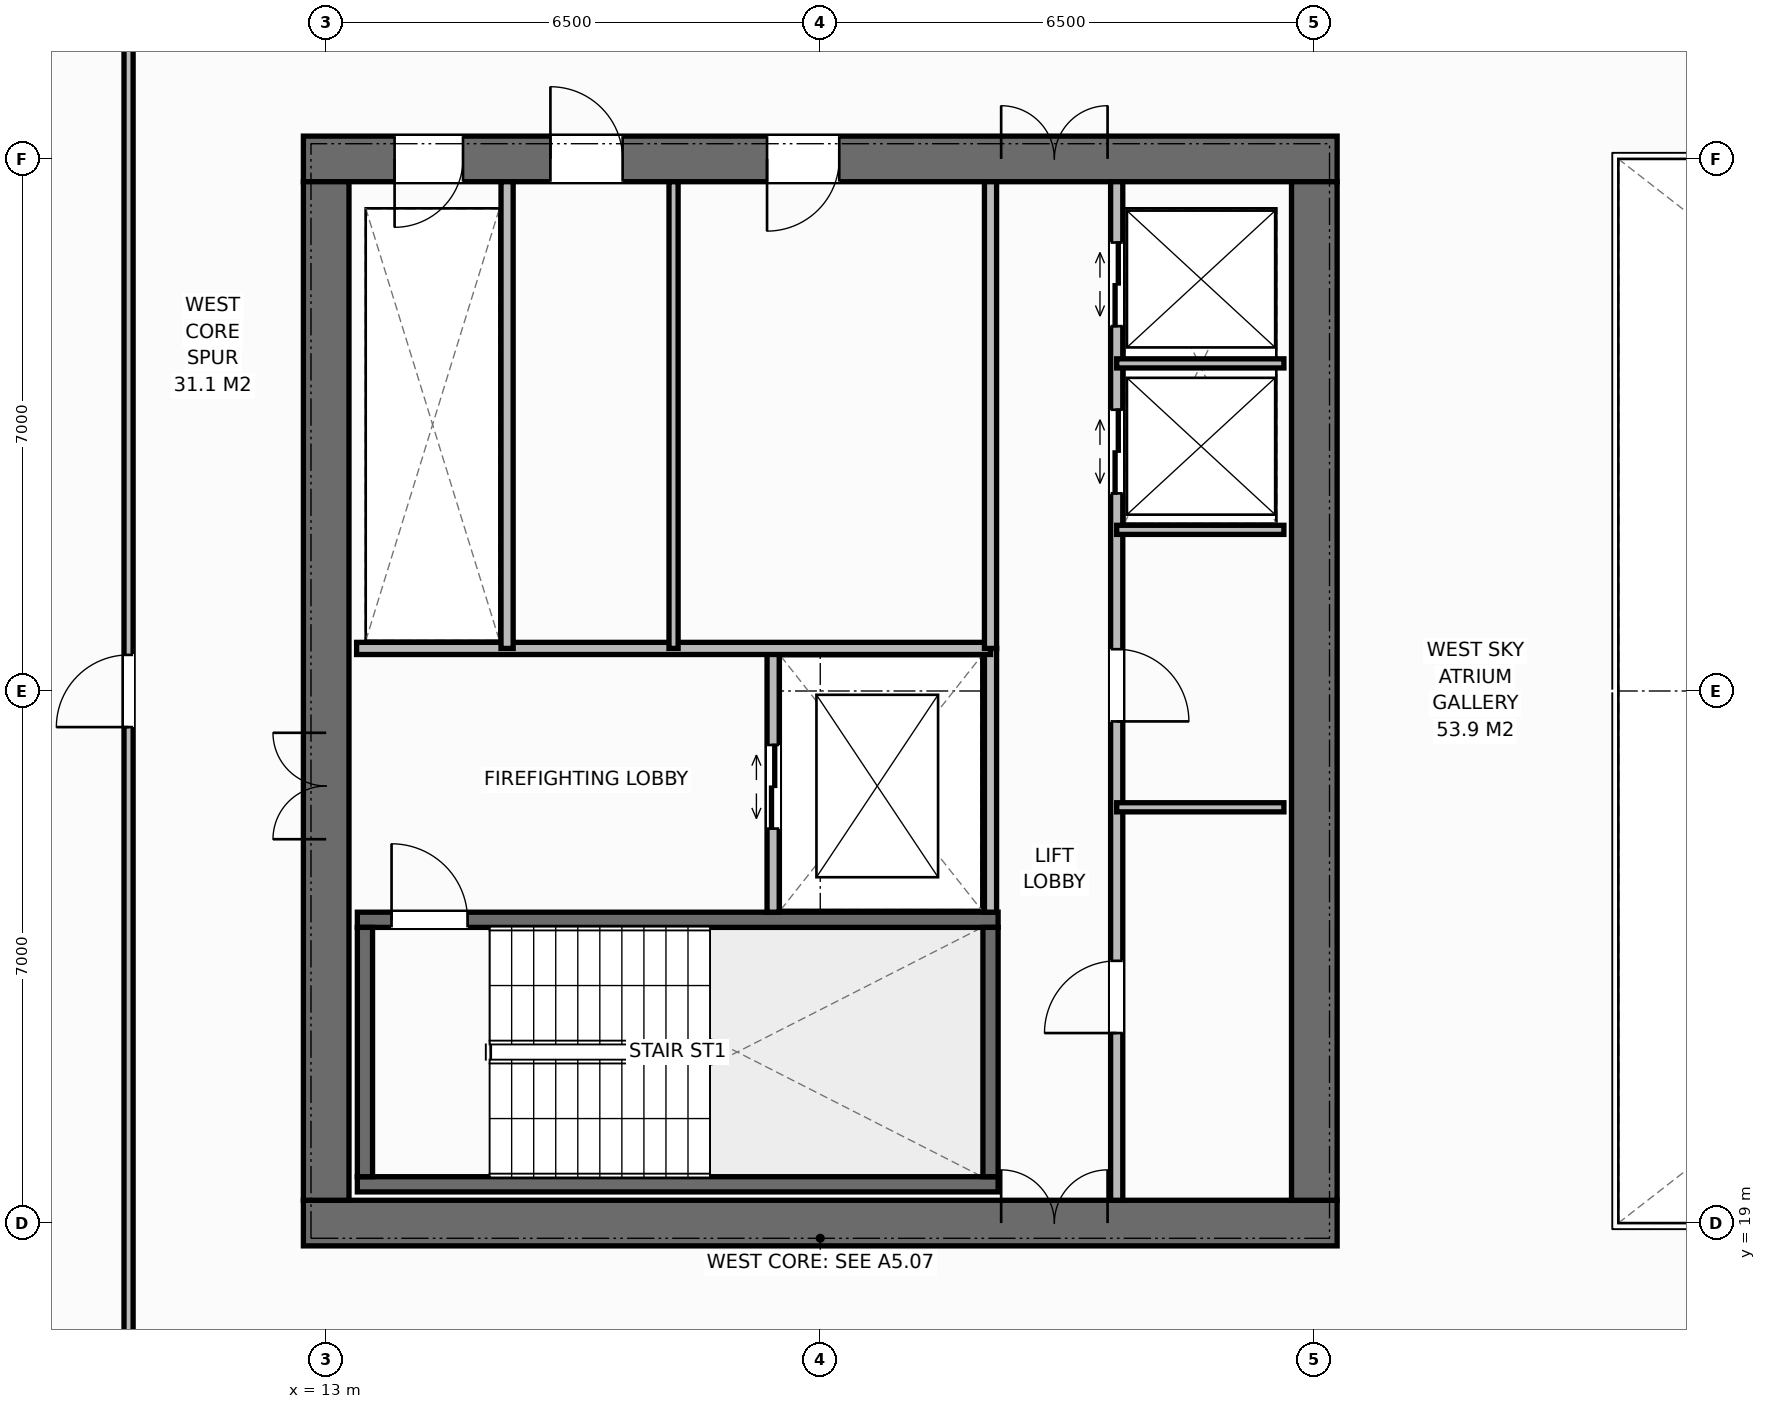
"""IFC4 building model, lengths in metres.
Left out: names, types, materials, properties, quantities, classifications, styles, units other than length and angle.
Written with IfcOpenShell. Run it as: python <this file> out.ifc"""

import sys

from ifc_helpers import new_model, si_unit, direction, frame, frame_2d, origin, place, context, subcontext, project, spatial, rectangle, extrude, element, fill, save


model = new_model("IFC4")
c1 = context("Model", 3, precision=1e-05, world=origin(), true_north=direction((0.0, 1.0)))
c2 = subcontext(c1, "Body", "Model", "MODEL_VIEW")
j1 = project(units=[si_unit("LENGTHUNIT", "METRE"), si_unit("PLANEANGLEUNIT", "RADIAN")], contexts=[c1])
p1 = place(None, origin())
s1 = spatial("IfcSite", under=j1, at=p1, CompositionType="ELEMENT")
p2 = place(p1, origin())
s2 = spatial("IfcBuilding", under=s1, at=p2, CompositionType="ELEMENT")
p3 = place(p2, frame((0.0, 0.0, 167.0)))
s3 = spatial("IfcBuildingStorey", under=s2, at=p3, CompositionType="ELEMENT", Elevation=167.0)
p4 = place(p3, frame((12.7, 19.0, 0.0), z_axis=(0.0, 0.0, 1.0), x_axis=(1.0, 0.0, 0.0)))
e1 = element("IfcWall", 1, at=p4, inside=s3, PredefinedType="SHEAR", context=c2, shape_type="SweptSolid", body=[
    extrude(rectangle(XDim=13.6, YDim=0.6, at=frame_2d((6.8, 0.0))), origin(), (0.0, 0.0, 1.0), 3.8),
])
p5 = place(p4, frame((9.18, 0.0, 0.0)))
e2 = element("IfcOpeningElement", 2, at=p5, cuts=e1, PredefinedType="OPENING", context=c2, shape_type="SweptSolid", body=[
    extrude(rectangle(XDim=1.4, YDim=2.2, at=frame_2d((0.7, 1.1))), frame((0.0, 0.31, 0.0), z_axis=(0.0, -1.0, 0.0), x_axis=(1.0, 0.0, 0.0)), (0.0, 0.0, 1.0), 0.62),
])
p6 = place(p3, frame((12.7, 33.0, 0.0), z_axis=(0.0, 0.0, 1.0), x_axis=(1.0, 0.0, 0.0)))
e3 = element("IfcWall", 3, at=p6, inside=s3, PredefinedType="SHEAR", context=c2, shape_type="SweptSolid", body=[
    extrude(rectangle(XDim=13.6, YDim=0.6, at=frame_2d((6.8, 0.0))), origin(), (0.0, 0.0, 1.0), 3.8),
])
p7 = place(p6, frame((1.2, 0.0, 0.0)))
e4 = element("IfcOpeningElement", 4, at=p7, cuts=e3, PredefinedType="OPENING", context=c2, shape_type="SweptSolid", body=[
    extrude(rectangle(XDim=0.9, YDim=2.15, at=frame_2d((0.45, 1.075))), frame((0.0, 0.31, 0.0), z_axis=(0.0, -1.0, 0.0), x_axis=(1.0, 0.0, 0.0)), (0.0, 0.0, 1.0), 0.62),
])
p8 = place(p6, frame((3.25, 0.0, 0.0)))
e5 = element("IfcOpeningElement", 5, at=p8, cuts=e3, PredefinedType="OPENING", context=c2, shape_type="SweptSolid", body=[
    extrude(rectangle(XDim=0.95, YDim=2.15, at=frame_2d((0.475, 1.075))), frame((0.0, 0.31, 0.0), z_axis=(0.0, -1.0, 0.0), x_axis=(1.0, 0.0, 0.0)), (0.0, 0.0, 1.0), 0.62),
])
p9 = place(p6, frame((6.1, 0.0, 0.0)))
e6 = element("IfcOpeningElement", 6, at=p9, cuts=e3, PredefinedType="OPENING", context=c2, shape_type="SweptSolid", body=[
    extrude(rectangle(XDim=0.95, YDim=2.15, at=frame_2d((0.475, 1.075))), frame((0.0, 0.31, 0.0), z_axis=(0.0, -1.0, 0.0), x_axis=(1.0, 0.0, 0.0)), (0.0, 0.0, 1.0), 0.62),
])
p10 = place(p6, frame((9.18, 0.0, 0.0)))
e7 = element("IfcOpeningElement", 7, at=p10, cuts=e3, PredefinedType="OPENING", context=c2, shape_type="SweptSolid", body=[
    extrude(rectangle(XDim=1.4, YDim=2.2, at=frame_2d((0.7, 1.1))), frame((0.0, 0.31, 0.0), z_axis=(0.0, -1.0, 0.0), x_axis=(1.0, 0.0, 0.0)), (0.0, 0.0, 1.0), 0.62),
])
p11 = place(p3, frame((13.0, 19.3, 0.0), z_axis=(0.0, 0.0, 1.0), x_axis=(0.0, 1.0, 0.0)))
e8 = element("IfcWall", 8, at=p11, inside=s3, PredefinedType="SHEAR", context=c2, shape_type="SweptSolid", body=[
    extrude(rectangle(XDim=13.4, YDim=0.6, at=frame_2d((6.7, 0.0))), origin(), (0.0, 0.0, 1.0), 3.8),
])
p12 = place(p11, frame((4.75, 0.0, 0.0)))
e9 = element("IfcOpeningElement", 9, at=p12, cuts=e8, PredefinedType="OPENING", context=c2, shape_type="SweptSolid", body=[
    extrude(rectangle(XDim=1.4, YDim=2.2, at=frame_2d((0.7, 1.1))), frame((0.0, 0.31, 0.0), z_axis=(0.0, -1.0, 0.0), x_axis=(1.0, 0.0, 0.0)), (0.0, 0.0, 1.0), 0.62),
])
p13 = place(p3, frame((26.0, 19.3, 0.0), z_axis=(0.0, 0.0, 1.0), x_axis=(0.0, 1.0, 0.0)))
e10 = element("IfcWall", 10, at=p13, inside=s3, PredefinedType="SHEAR", context=c2, shape_type="SweptSolid", body=[
    extrude(rectangle(XDim=13.4, YDim=0.6, at=frame_2d((6.7, 0.0))), origin(), (0.0, 0.0, 1.0), 3.8),
])
p14 = place(p3, frame((13.41, 19.51, 0.0), z_axis=(0.0, 0.0, 1.0), x_axis=(1.0, 0.0, 0.0)))
e11 = element("IfcWall", 11, at=p14, inside=s3, PredefinedType="SHEAR", context=c2, shape_type="SweptSolid", body=[
    extrude(rectangle(XDim=8.43, YDim=0.2, at=frame_2d((4.215, 0.0))), origin(), (0.0, 0.0, 1.0), 3.8),
])
p15 = place(p3, frame((13.41, 22.99, 0.0), z_axis=(0.0, 0.0, 1.0), x_axis=(1.0, 0.0, 0.0)))
e12 = element("IfcWall", 12, at=p15, inside=s3, PredefinedType="SHEAR", context=c2, shape_type="SweptSolid", body=[
    extrude(rectangle(XDim=8.43, YDim=0.2, at=frame_2d((4.215, 0.0))), origin(), (0.0, 0.0, 1.0), 3.8),
])
p16 = place(p15, frame((0.45, 0.0, 0.0)))
e13 = element("IfcOpeningElement", 13, at=p16, cuts=e12, PredefinedType="OPENING", context=c2, shape_type="SweptSolid", body=[
    extrude(rectangle(XDim=1.0, YDim=2.15, at=frame_2d((0.5, 1.075))), frame((0.0, 0.11, 0.0), z_axis=(0.0, -1.0, 0.0), x_axis=(1.0, 0.0, 0.0)), (0.0, 0.0, 1.0), 0.22),
])
for number, where, z_axis, x_axis in (
    (14, (13.51, 19.61, 0.0), (0.0, 0.0, 1.0), (0.0, 1.0, 0.0)),
    (15, (21.74, 19.61, 0.0), (0.0, 0.0, 1.0), (0.0, 1.0, 0.0)),
):
    element("IfcWall", number, at=place(p3, frame(where, z_axis=z_axis, x_axis=x_axis)), inside=s3, PredefinedType="SHEAR", context=c2, shape_type="SweptSolid", body=[
        extrude(rectangle(XDim=3.28, YDim=0.2, at=frame_2d((1.64, 0.0))), origin(), (0.0, 0.0, 1.0), 3.8),
    ])
p17 = place(p3, frame((21.74, 23.09, 0.0), z_axis=(0.0, 0.0, 1.0), x_axis=(0.0, 1.0, 0.0)))
e16 = element("IfcWall", 16, at=p17, inside=s3, PredefinedType="STANDARD", context=c2, shape_type="SweptSolid", body=[
    extrude(rectangle(XDim=3.47, YDim=0.16, at=frame_2d((1.735, 0.0))), origin(), (0.0, 0.0, 1.0), 3.572),
])
p18 = place(p3, frame((18.88, 23.09, 0.0), z_axis=(0.0, 0.0, 1.0), x_axis=(0.0, 1.0, 0.0)))
e17 = element("IfcWall", 17, at=p18, inside=s3, PredefinedType="STANDARD", context=c2, shape_type="SweptSolid", body=[
    extrude(rectangle(XDim=3.47, YDim=0.16, at=frame_2d((1.735, 0.0))), origin(), (0.0, 0.0, 1.0), 3.572),
])
p19 = place(p18, frame((1.1, 0.0, 0.0)))
e18 = element("IfcOpeningElement", 18, at=p19, cuts=e17, PredefinedType="OPENING", context=c2, shape_type="SweptSolid", body=[
    extrude(rectangle(XDim=1.1, YDim=2.2, at=frame_2d((0.55, 1.1))), frame((0.0, 0.09, 0.0), z_axis=(0.0, -1.0, 0.0), x_axis=(1.0, 0.0, 0.0)), (0.0, 0.0, 1.0), 0.18),
])
p20 = place(p3, frame((13.4, 26.56, 0.0), z_axis=(0.0, 0.0, 1.0), x_axis=(1.0, 0.0, 0.0)))
e19 = element("IfcWall", 19, at=p20, inside=s3, PredefinedType="STANDARD", context=c2, shape_type="SweptSolid", body=[
    extrude(rectangle(XDim=8.34, YDim=0.16, at=frame_2d((4.17, 0.0))), origin(), (0.0, 0.0, 1.0), 3.572),
])
p21 = place(p3, frame((15.38, 26.56, 0.0), z_axis=(0.0, 0.0, 1.0), x_axis=(0.0, 1.0, 0.0)))
e20 = element("IfcWall", 20, at=p21, inside=s3, PredefinedType="STANDARD", context=c2, shape_type="SweptSolid", body=[
    extrude(rectangle(XDim=6.14, YDim=0.16, at=frame_2d((3.07, 0.0))), origin(), (0.0, 0.0, 1.0), 3.572),
])
p22 = place(p3, frame((17.57, 26.56, 0.0), z_axis=(0.0, 0.0, 1.0), x_axis=(0.0, 1.0, 0.0)))
e21 = element("IfcWall", 21, at=p22, inside=s3, PredefinedType="PARTITIONING", context=c2, shape_type="SweptSolid", body=[
    extrude(rectangle(XDim=6.14, YDim=0.12, at=frame_2d((3.07, 0.0))), origin(), (0.0, 0.0, 1.0), 3.572),
])
p23 = place(p3, frame((21.74, 26.56, 0.0), z_axis=(0.0, 0.0, 1.0), x_axis=(0.0, 1.0, 0.0)))
e22 = element("IfcWall", 22, at=p23, inside=s3, PredefinedType="STANDARD", context=c2, shape_type="SweptSolid", body=[
    extrude(rectangle(XDim=6.14, YDim=0.16, at=frame_2d((3.07, 0.0))), origin(), (0.0, 0.0, 1.0), 3.572),
])
p24 = place(p3, frame((23.4, 19.3, 0.0), z_axis=(0.0, 0.0, 1.0), x_axis=(0.0, 1.0, 0.0)))
e23 = element("IfcWall", 23, at=p24, inside=s3, PredefinedType="STANDARD", context=c2, shape_type="SweptSolid", body=[
    extrude(rectangle(XDim=13.4, YDim=0.16, at=frame_2d((6.7, 0.0))), origin(), (0.0, 0.0, 1.0), 3.572),
])
p25 = place(p24, frame((2.2, 0.0, 0.0)))
e24 = element("IfcOpeningElement", 24, at=p25, cuts=e23, PredefinedType="OPENING", context=c2, shape_type="SweptSolid", body=[
    extrude(rectangle(XDim=0.95, YDim=2.15, at=frame_2d((0.475, 1.075))), frame((0.0, 0.09, 0.0), z_axis=(0.0, -1.0, 0.0), x_axis=(1.0, 0.0, 0.0)), (0.0, 0.0, 1.0), 0.18),
])
p26 = place(p24, frame((6.3, 0.0, 0.0)))
e25 = element("IfcOpeningElement", 25, at=p26, cuts=e23, PredefinedType="OPENING", context=c2, shape_type="SweptSolid", body=[
    extrude(rectangle(XDim=0.95, YDim=2.15, at=frame_2d((0.475, 1.075))), frame((0.0, 0.09, 0.0), z_axis=(0.0, -1.0, 0.0), x_axis=(1.0, 0.0, 0.0)), (0.0, 0.0, 1.0), 0.18),
])
p27 = place(p24, frame((9.3, 0.0, 0.0)))
e26 = element("IfcOpeningElement", 26, at=p27, cuts=e23, PredefinedType="OPENING", context=c2, shape_type="SweptSolid", body=[
    extrude(rectangle(XDim=1.1, YDim=2.2, at=frame_2d((0.55, 1.1))), frame((0.0, 0.09, 0.0), z_axis=(0.0, -1.0, 0.0), x_axis=(1.0, 0.0, 0.0)), (0.0, 0.0, 1.0), 0.18),
])
p28 = place(p24, frame((11.5, 0.0, 0.0)))
e27 = element("IfcOpeningElement", 27, at=p28, cuts=e23, PredefinedType="OPENING", context=c2, shape_type="SweptSolid", body=[
    extrude(rectangle(XDim=1.1, YDim=2.2, at=frame_2d((0.55, 1.1))), frame((0.0, 0.09, 0.0), z_axis=(0.0, -1.0, 0.0), x_axis=(1.0, 0.0, 0.0)), (0.0, 0.0, 1.0), 0.18),
])
for number, where, z_axis, x_axis in (
    (28, (23.4, 24.47, 0.0), (0.0, 0.0, 1.0), (1.0, 0.0, 0.0)),
    (29, (23.4, 28.12, 0.0), (0.0, 0.0, 1.0), (1.0, 0.0, 0.0)),
    (30, (23.4, 30.31, 0.0), (0.0, 0.0, 1.0), (1.0, 0.0, 0.0)),
):
    element("IfcWall", number, at=place(p3, frame(where, z_axis=z_axis, x_axis=x_axis)), inside=s3, PredefinedType="PARTITIONING", context=c2, shape_type="SweptSolid", body=[
        extrude(rectangle(XDim=2.2, YDim=0.12, at=frame_2d((1.1, 0.0))), origin(), (0.0, 0.0, 1.0), 3.572),
    ])
p29 = place(p3, frame((10.4, 16.5, 0.0), z_axis=(0.0, 0.0, 1.0), x_axis=(0.0, 1.0, 0.0)))
e31 = element("IfcWall", 31, at=p29, inside=s3, PredefinedType="PARTITIONING", context=c2, shape_type="SweptSolid", body=[
    extrude(rectangle(XDim=19.0, YDim=0.12, at=frame_2d((9.5, 0.0))), origin(), (0.0, 0.0, 1.0), 3.572),
])
p30 = place(p29, frame((9.025, 0.0, 0.0)))
e32 = element("IfcOpeningElement", 32, at=p30, cuts=e31, PredefinedType="OPENING", context=c2, shape_type="SweptSolid", body=[
    extrude(rectangle(XDim=0.95, YDim=2.15, at=frame_2d((0.475, 1.075))), frame((0.0, 0.07, 0.0), z_axis=(0.0, -1.0, 0.0), x_axis=(1.0, 0.0, 0.0)), (0.0, 0.0, 1.0), 0.14),
])
p31 = place(p16, origin())
e33 = element("IfcDoor", 33, at=p31, inside=s3, OperationType="SINGLE_SWING_LEFT", PredefinedType="DOOR", context=c2, shape_type="SweptSolid", body=[
    extrude(rectangle(XDim=1.0, YDim=2.15, at=frame_2d((0.5, 1.075))), frame((0.0, 0.025, 0.0), z_axis=(0.0, -1.0, 0.0), x_axis=(1.0, 0.0, 0.0)), (0.0, 0.0, 1.0), 0.05),
])
fill(e13, e33)
p32 = place(p12, origin())
e34 = element("IfcDoor", 34, at=p32, inside=s3, OperationType="DOUBLE_DOOR_SINGLE_SWING", PredefinedType="DOOR", context=c2, shape_type="SweptSolid", body=[
    extrude(rectangle(XDim=1.4, YDim=2.2, at=frame_2d((0.7, 1.1))), frame((0.0, 0.025, 0.0), z_axis=(0.0, -1.0, 0.0), x_axis=(1.0, 0.0, 0.0)), (0.0, 0.0, 1.0), 0.05),
])
fill(e9, e34)
p33 = place(p19, origin())
e35 = element("IfcDoor", 35, at=p33, inside=s3, OperationType="DOUBLE_DOOR_SLIDING", PredefinedType="DOOR", context=c2, shape_type="SweptSolid", body=[
    extrude(rectangle(XDim=1.1, YDim=2.2, at=frame_2d((0.55, 1.1))), frame((0.0, 0.025, 0.0), z_axis=(0.0, -1.0, 0.0), x_axis=(1.0, 0.0, 0.0)), (0.0, 0.0, 1.0), 0.05),
])
fill(e18, e35)
p34 = place(p7, origin())
e36 = element("IfcDoor", 36, at=p34, inside=s3, OperationType="SINGLE_SWING_RIGHT", PredefinedType="DOOR", context=c2, shape_type="SweptSolid", body=[
    extrude(rectangle(XDim=0.9, YDim=2.15, at=frame_2d((0.45, 1.075))), frame((0.0, -0.025, 0.0), z_axis=(0.0, -1.0, 0.0), x_axis=(1.0, 0.0, 0.0)), (0.0, 0.0, 1.0), 0.05),
])
fill(e4, e36)
p35 = place(p8, origin())
e37 = element("IfcDoor", 37, at=p35, inside=s3, OperationType="SINGLE_SWING_LEFT", PredefinedType="DOOR", context=c2, shape_type="SweptSolid", body=[
    extrude(rectangle(XDim=0.95, YDim=2.15, at=frame_2d((0.475, 1.075))), frame((0.0, -0.025, 0.0), z_axis=(0.0, -1.0, 0.0), x_axis=(1.0, 0.0, 0.0)), (0.0, 0.0, 1.0), 0.05),
])
fill(e5, e37)
p36 = place(p9, origin())
e38 = element("IfcDoor", 38, at=p36, inside=s3, OperationType="SINGLE_SWING_RIGHT", PredefinedType="DOOR", context=c2, shape_type="SweptSolid", body=[
    extrude(rectangle(XDim=0.95, YDim=2.15, at=frame_2d((0.475, 1.075))), frame((0.0, -0.025, 0.0), z_axis=(0.0, -1.0, 0.0), x_axis=(1.0, 0.0, 0.0)), (0.0, 0.0, 1.0), 0.05),
])
fill(e6, e38)
p37 = place(p5, origin())
e39 = element("IfcDoor", 39, at=p37, inside=s3, OperationType="DOUBLE_DOOR_SINGLE_SWING", PredefinedType="DOOR", context=c2, shape_type="SweptSolid", body=[
    extrude(rectangle(XDim=1.4, YDim=2.2, at=frame_2d((0.7, 1.1))), frame((0.0, 0.075, 0.0), z_axis=(0.0, -1.0, 0.0), x_axis=(1.0, 0.0, 0.0)), (0.0, 0.0, 1.0), 0.05),
])
fill(e2, e39)
p38 = place(p10, origin())
e40 = element("IfcDoor", 40, at=p38, inside=s3, OperationType="DOUBLE_DOOR_SINGLE_SWING", PredefinedType="DOOR", context=c2, shape_type="SweptSolid", body=[
    extrude(rectangle(XDim=1.4, YDim=2.2, at=frame_2d((0.7, 1.1))), frame((0.0, -0.025, 0.0), z_axis=(0.0, -1.0, 0.0), x_axis=(1.0, 0.0, 0.0)), (0.0, 0.0, 1.0), 0.05),
])
fill(e7, e40)
p39 = place(p25, origin())
e41 = element("IfcDoor", 41, at=p39, inside=s3, OperationType="SINGLE_SWING_LEFT", PredefinedType="DOOR", context=c2, shape_type="SweptSolid", body=[
    extrude(rectangle(XDim=0.95, YDim=2.15, at=frame_2d((0.475, 1.075))), frame((0.0, 0.025, 0.0), z_axis=(0.0, -1.0, 0.0), x_axis=(1.0, 0.0, 0.0)), (0.0, 0.0, 1.0), 0.05),
])
fill(e24, e41)
p40 = place(p26, origin())
e42 = element("IfcDoor", 42, at=p40, inside=s3, OperationType="SINGLE_SWING_RIGHT", PredefinedType="DOOR", context=c2, shape_type="SweptSolid", body=[
    extrude(rectangle(XDim=0.95, YDim=2.15, at=frame_2d((0.475, 1.075))), frame((0.0, 0.025, 0.0), z_axis=(0.0, -1.0, 0.0), x_axis=(1.0, 0.0, 0.0)), (0.0, 0.0, 1.0), 0.05),
])
fill(e25, e42)
p41 = place(p27, origin())
e43 = element("IfcDoor", 43, at=p41, inside=s3, OperationType="DOUBLE_DOOR_SLIDING", PredefinedType="DOOR", context=c2, shape_type="SweptSolid", body=[
    extrude(rectangle(XDim=1.1, YDim=2.2, at=frame_2d((0.55, 1.1))), frame((0.0, 0.025, 0.0), z_axis=(0.0, -1.0, 0.0), x_axis=(1.0, 0.0, 0.0)), (0.0, 0.0, 1.0), 0.05),
])
fill(e26, e43)
p42 = place(p28, origin())
e44 = element("IfcDoor", 44, at=p42, inside=s3, OperationType="DOUBLE_DOOR_SLIDING", PredefinedType="DOOR", context=c2, shape_type="SweptSolid", body=[
    extrude(rectangle(XDim=1.1, YDim=2.2, at=frame_2d((0.55, 1.1))), frame((0.0, 0.025, 0.0), z_axis=(0.0, -1.0, 0.0), x_axis=(1.0, 0.0, 0.0)), (0.0, 0.0, 1.0), 0.05),
])
fill(e27, e44)
p43 = place(p30, origin())
e45 = element("IfcDoor", 45, at=p43, inside=s3, OperationType="SINGLE_SWING_LEFT", PredefinedType="DOOR", context=c2, shape_type="SweptSolid", body=[
    extrude(rectangle(XDim=0.95, YDim=2.15, at=frame_2d((0.475, 1.075))), frame((0.0, 0.025, 0.0), z_axis=(0.0, -1.0, 0.0), x_axis=(1.0, 0.0, 0.0)), (0.0, 0.0, 1.0), 0.05),
])
fill(e32, e45)
save(model, sys.argv[1])
